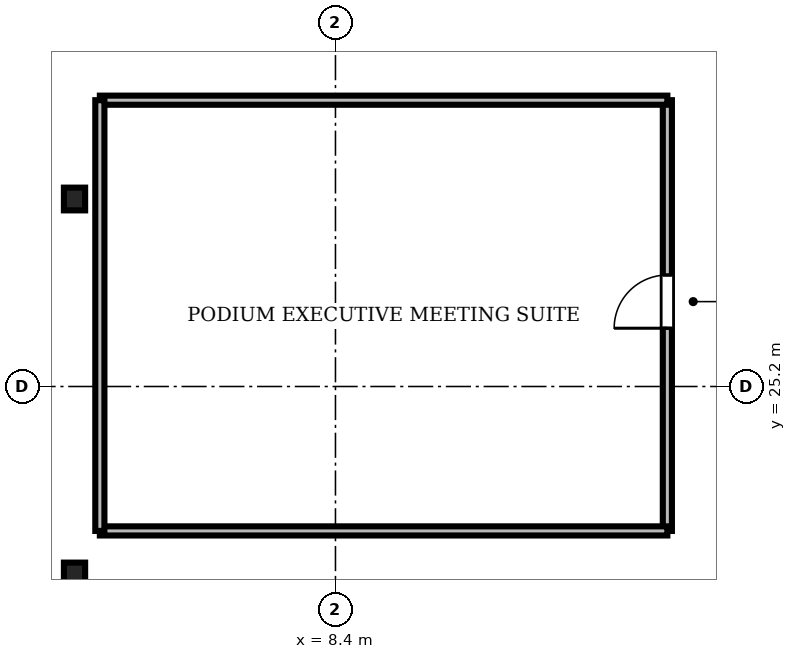
"""IFC4 building model, lengths in metres.
Left out: names, types, materials, properties, quantities, classifications, styles, units other than length and angle.
Written with IfcOpenShell. Run it as: python <this file> out.ifc"""

import sys

from ifc_helpers import new_model, si_unit, direction, frame, frame_2d, origin, origin_2d, place, context, subcontext, project, spatial, rectangle, i_section, extrude, source, transform, mapped, element, fill, save


model = new_model("IFC4")
c1 = context("Model", 3, precision=1e-05, world=origin(), true_north=direction((0.0, 1.0)))
c2 = subcontext(c1, "Body", "Model", "MODEL_VIEW")
j1 = project(units=[si_unit("LENGTHUNIT", "METRE"), si_unit("PLANEANGLEUNIT", "RADIAN")], contexts=[c1])
p1 = place(None, origin())
s1 = spatial("IfcSite", under=j1, at=p1, CompositionType="ELEMENT")
p2 = place(p1, origin())
s2 = spatial("IfcBuilding", under=s1, at=p2, CompositionType="ELEMENT")
p3 = place(p2, frame((0.0, 0.0, 17.0)))
s3 = spatial("IfcBuildingStorey", under=s2, at=p3, CompositionType="ELEMENT", Elevation=17.0)
m1 = source(origin(), c2, "Body", "SweptSolid", [
    extrude(i_section(OverallWidth=0.419, OverallDepth=0.449, WebThickness=0.031, FlangeThickness=0.048, FilletRadius=0.015, at=origin_2d()), origin(), (0.0, 0.0, 1.0), 5.08),
])
for number, where, z_axis, x_axis in (
    (1, (3.25, 28.9, 0.0), (0.0, 0.0, 1.0), (1.0, 0.0, 0.0)),
    (2, (3.25, 21.5, 0.0), (0.0, 0.0, 1.0), (1.0, 0.0, 0.0)),
):
    element("IfcColumn", number, at=place(p3, frame(where, z_axis=z_axis, x_axis=x_axis)), inside=s3, PredefinedType="COLUMN", context=c2, shape_type="MappedRepresentation", body=[
        mapped(m1, transform((0.0, 0.0, 0.0), scale=1.0)),
    ])
m2 = source(origin(), c2, "Body", "SweptSolid", [
    extrude(rectangle(XDim=8.5, YDim=0.18, at=frame_2d((4.25, 0.0))), origin(), (0.0, 0.0, 1.0), 5.08),
])
p4 = place(p3, frame((14.95, 22.35, 0.0), z_axis=(0.0, 0.0, 1.0), x_axis=(0.0, 1.0, 0.0)))
e3 = element("IfcWall", 3, at=p4, inside=s3, PredefinedType="PARTITIONING", context=c2, shape_type="MappedRepresentation", body=[
    mapped(m2, transform((0.0, 0.0, 0.0), scale=1.0)),
])
m3 = source(origin(), c2, "Body", "SweptSolid", [
    extrude(rectangle(XDim=1.05, YDim=2.2, at=frame_2d((0.525, 1.1))), frame((0.0, 0.1, 0.0), z_axis=(0.0, -1.0, 0.0), x_axis=(1.0, 0.0, 0.0)), (0.0, 0.0, 1.0), 0.2),
])
p5 = place(p4, frame((4.0, 0.0, 0.0)))
e4 = element("IfcOpeningElement", 4, at=p5, cuts=e3, PredefinedType="OPENING", context=c2, shape_type="MappedRepresentation", body=[
    mapped(m3, transform((0.0, 0.0, 0.0), scale=1.0)),
])
m4 = source(origin(), c2, "Body", "SweptSolid", [
    extrude(rectangle(XDim=11.2, YDim=0.18, at=frame_2d((5.6, 0.0))), origin(), (0.0, 0.0, 1.0), 5.08),
])
for number, where, z_axis, x_axis in (
    (5, (3.75, 22.35, 0.0), (0.0, 0.0, 1.0), (1.0, 0.0, 0.0)),
    (6, (3.75, 30.85, 0.0), (0.0, 0.0, 1.0), (1.0, 0.0, 0.0)),
):
    element("IfcWall", number, at=place(p3, frame(where, z_axis=z_axis, x_axis=x_axis)), inside=s3, PredefinedType="PARTITIONING", context=c2, shape_type="MappedRepresentation", body=[
        mapped(m4, transform((0.0, 0.0, 0.0), scale=1.0)),
    ])
p6 = place(p3, frame((3.75, 22.35, 0.0), z_axis=(0.0, 0.0, 1.0), x_axis=(0.0, 1.0, 0.0)))
e7 = element("IfcWall", 7, at=p6, inside=s3, PredefinedType="PARTITIONING", context=c2, shape_type="MappedRepresentation", body=[
    mapped(m2, transform((0.0, 0.0, 0.0), scale=1.0)),
])
m5 = source(origin(), c2, "Body", "SweptSolid", [
    extrude(rectangle(XDim=1.05, YDim=2.2, at=frame_2d((0.525, 1.1))), frame((0.0, 0.025, 0.0), z_axis=(0.0, -1.0, 0.0), x_axis=(1.0, 0.0, 0.0)), (0.0, 0.0, 1.0), 0.05),
])
p7 = place(p5, origin())
e8 = element("IfcDoor", 8, at=p7, inside=s3, OperationType="SINGLE_SWING_LEFT", PredefinedType="DOOR", context=c2, shape_type="MappedRepresentation", body=[
    mapped(m5, transform((0.0, 0.0, 0.0), scale=1.0)),
])
fill(e4, e8)
save(model, sys.argv[1])
